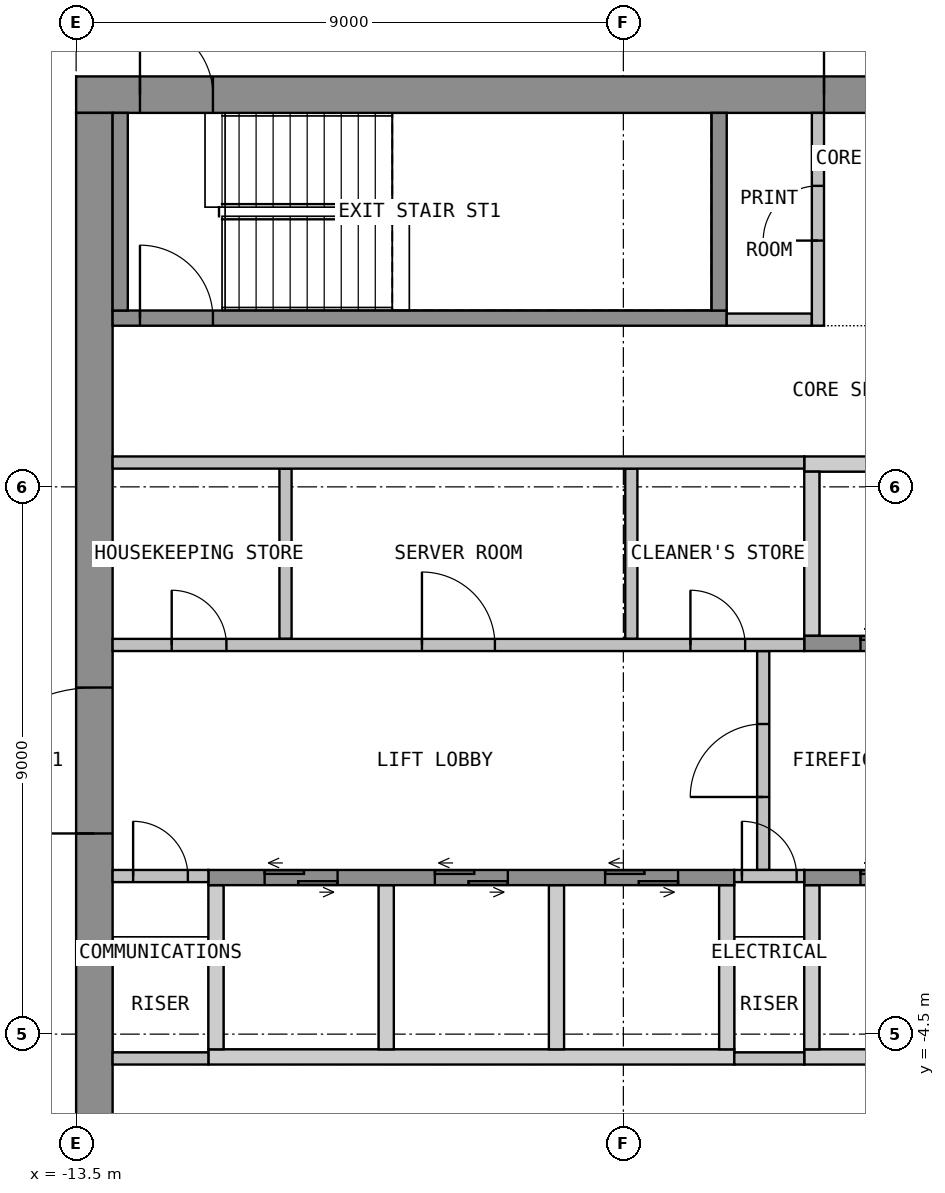
"""IFC4 building model, lengths in metres.
Left out: names, types, materials, properties, quantities, classifications, styles, units other than length and angle.
Written with IfcOpenShell. Run it as: python <this file> out.ifc"""

import sys

from ifc_helpers import new_model, si_unit, direction, frame, frame_2d, origin, place, context, subcontext, project, spatial, polyline, rectangle, outline, extrude, element, fill, save


model = new_model("IFC4")
c1 = context("Model", 3, precision=1e-05, world=origin(), true_north=direction((0.0, 1.0)))
c2 = subcontext(c1, "Body", "Model", "MODEL_VIEW")
j1 = project(units=[si_unit("LENGTHUNIT", "METRE"), si_unit("PLANEANGLEUNIT", "RADIAN")], contexts=[c1])
p1 = place(None, origin())
s1 = spatial("IfcSite", under=j1, at=p1, CompositionType="ELEMENT")
p2 = place(p1, origin())
s2 = spatial("IfcBuilding", under=s1, at=p2, CompositionType="ELEMENT")
p3 = place(p2, frame((0.0, 0.0, 246.9)))
s3 = spatial("IfcBuildingStorey", under=s2, at=p3, CompositionType="ELEMENT", Elevation=246.9)
p4 = place(p3, frame((-13.5, 10.95, 0.0), z_axis=(0.0, 0.0, 1.0), x_axis=(1.0, 0.0, 0.0)))
e1 = element("IfcWall", 1, at=p4, inside=s3, PredefinedType="SHEAR", context=c2, shape_type="SweptSolid", body=[
    extrude(rectangle(XDim=27.0, YDim=0.6, at=frame_2d((13.5, 0.0))), origin(), (0.0, 0.0, 1.0), 3.575),
])
p5 = place(p4, frame((12.3, 0.0, 0.0)))
e2 = element("IfcOpeningElement", 2, at=p5, cuts=e1, PredefinedType="OPENING", context=c2, shape_type="SweptSolid", body=[
    extrude(rectangle(XDim=2.4, YDim=2.1, at=frame_2d((1.2, 1.05))), frame((0.0, 0.31, 0.0), z_axis=(0.0, -1.0, 0.0), x_axis=(1.0, 0.0, 0.0)), (0.0, 0.0, 1.0), 0.62),
])
p6 = place(p4, frame((1.05, 0.0, 0.0)))
e3 = element("IfcOpeningElement", 3, at=p6, cuts=e1, PredefinedType="OPENING", context=c2, shape_type="SweptSolid", body=[
    extrude(rectangle(XDim=1.2, YDim=2.1, at=frame_2d((0.6, 1.05))), frame((0.0, 0.31, 0.0), z_axis=(0.0, -1.0, 0.0), x_axis=(1.0, 0.0, 0.0)), (0.0, 0.0, 1.0), 0.62),
])
p7 = place(p4, frame((24.75, 0.0, 0.0)))
e4 = element("IfcOpeningElement", 4, at=p7, cuts=e1, PredefinedType="OPENING", context=c2, shape_type="SweptSolid", body=[
    extrude(rectangle(XDim=1.2, YDim=2.1, at=frame_2d((0.6, 1.05))), frame((0.0, 0.31, 0.0), z_axis=(0.0, -1.0, 0.0), x_axis=(1.0, 0.0, 0.0)), (0.0, 0.0, 1.0), 0.62),
])
p8 = place(p3, frame((-13.2, -10.65, 0.0), z_axis=(0.0, 0.0, 1.0), x_axis=(0.0, 1.0, 0.0)))
e5 = element("IfcWall", 5, at=p8, inside=s3, PredefinedType="SHEAR", context=c2, shape_type="SweptSolid", body=[
    extrude(rectangle(XDim=21.3, YDim=0.6, at=frame_2d((10.65, 0.0))), origin(), (0.0, 0.0, 1.0), 3.575),
])
p9 = place(p8, frame((9.45, 0.0, 0.0)))
e6 = element("IfcOpeningElement", 6, at=p9, cuts=e5, PredefinedType="OPENING", context=c2, shape_type="SweptSolid", body=[
    extrude(rectangle(XDim=2.4, YDim=2.1, at=frame_2d((1.2, 1.05))), frame((0.0, 0.31, 0.0), z_axis=(0.0, -1.0, 0.0), x_axis=(1.0, 0.0, 0.0)), (0.0, 0.0, 1.0), 0.62),
])
p10 = place(p3, origin())
e7 = element("IfcWall", 7, at=p10, inside=s3, PredefinedType="SHEAR", context=c2, shape_type="SweptSolid", body=[
    extrude(outline(polyline([(-1.525, 4.75), (1.525, 4.75), (1.525, 5.0), (-1.525, 5.0), (-1.525, 4.75)])), origin(), (0.0, 0.0, 1.0), 3.575),
])
p11 = place(p3, origin())
e8 = element("IfcWall", 8, at=p11, inside=s3, PredefinedType="SHEAR", context=c2, shape_type="SweptSolid", body=[
    extrude(outline(polyline([(-1.525, 2.05), (-1.275, 2.05), (-1.275, 4.75), (-1.525, 4.75), (-1.525, 2.05)])), origin(), (0.0, 0.0, 1.0), 3.575),
])
p12 = place(p3, frame((-1.525, 1.925, 0.0), z_axis=(0.0, 0.0, 1.0), x_axis=(1.0, 0.0, 0.0)))
e9 = element("IfcWall", 9, at=p12, inside=s3, PredefinedType="SHEAR", context=c2, shape_type="SweptSolid", body=[
    extrude(rectangle(XDim=3.05, YDim=0.25, at=frame_2d((1.525, 0.0))), origin(), (0.0, 0.0, 1.0), 3.575),
])
p13 = place(p12, frame((0.925, 0.0, 0.0)))
e10 = element("IfcOpeningElement", 10, at=p13, cuts=e9, PredefinedType="OPENING", context=c2, shape_type="SweptSolid", body=[
    extrude(rectangle(XDim=1.2, YDim=2.1, at=frame_2d((0.6, 1.05))), frame((0.0, 0.135, 0.0), z_axis=(0.0, -1.0, 0.0), x_axis=(1.0, 0.0, 0.0)), (0.0, 0.0, 1.0), 0.27),
])
p14 = place(p3, origin())
e11 = element("IfcWall", 11, at=p14, inside=s3, PredefinedType="SHEAR", context=c2, shape_type="SweptSolid", body=[
    extrude(outline(polyline([(-11.325, -5.0), (-2.675, -5.0), (-2.675, -4.75), (-11.325, -4.75), (-11.325, -5.0)])), origin(), (0.0, 0.0, 1.0), 3.575),
])
p15 = place(p3, origin())
e12 = element("IfcWall", 12, at=p15, inside=s3, PredefinedType="SHEAR", context=c2, shape_type="SweptSolid", body=[
    extrude(outline(polyline([(-1.525, -5.0), (4.325, -5.0), (4.325, -4.75), (-1.525, -4.75), (-1.525, -5.0)])), origin(), (0.0, 0.0, 1.0), 3.575),
])
p16 = place(p3, origin())
e13 = element("IfcWall", 13, at=p16, inside=s3, PredefinedType="SHEAR", context=c2, shape_type="SweptSolid", body=[
    extrude(outline(polyline([(-11.325, -4.75), (-11.075, -4.75), (-11.075, -2.05), (-11.325, -2.05), (-11.325, -4.75)])), origin(), (0.0, 0.0, 1.0), 3.575),
])
p17 = place(p3, origin())
e14 = element("IfcWall", 14, at=p17, inside=s3, PredefinedType="SHEAR", context=c2, shape_type="SweptSolid", body=[
    extrude(outline(polyline([(-8.525, -4.75), (-8.275, -4.75), (-8.275, -2.05), (-8.525, -2.05), (-8.525, -4.75)])), origin(), (0.0, 0.0, 1.0), 3.575),
])
p18 = place(p3, origin())
e15 = element("IfcWall", 15, at=p18, inside=s3, PredefinedType="SHEAR", context=c2, shape_type="SweptSolid", body=[
    extrude(outline(polyline([(-5.725, -4.75), (-5.475, -4.75), (-5.475, -2.05), (-5.725, -2.05), (-5.725, -4.75)])), origin(), (0.0, 0.0, 1.0), 3.575),
])
p19 = place(p3, origin())
e16 = element("IfcWall", 16, at=p19, inside=s3, PredefinedType="SHEAR", context=c2, shape_type="SweptSolid", body=[
    extrude(outline(polyline([(-2.925, -4.75), (-2.675, -4.75), (-2.675, -2.05), (-2.925, -2.05), (-2.925, -4.75)])), origin(), (0.0, 0.0, 1.0), 3.575),
])
p20 = place(p3, origin())
e17 = element("IfcWall", 17, at=p20, inside=s3, PredefinedType="SHEAR", context=c2, shape_type="SweptSolid", body=[
    extrude(outline(polyline([(-1.525, -4.75), (-1.275, -4.75), (-1.275, -2.05), (-1.525, -2.05), (-1.525, -4.75)])), origin(), (0.0, 0.0, 1.0), 3.575),
])
p21 = place(p3, frame((-11.325, -1.925, 0.0), z_axis=(0.0, 0.0, 1.0), x_axis=(1.0, 0.0, 0.0)))
e18 = element("IfcWall", 18, at=p21, inside=s3, PredefinedType="SHEAR", context=c2, shape_type="SweptSolid", body=[
    extrude(rectangle(XDim=8.65, YDim=0.25, at=frame_2d((4.325, 0.0))), origin(), (0.0, 0.0, 1.0), 3.575),
])
p22 = place(p21, frame((0.925, 0.0, 0.0)))
e19 = element("IfcOpeningElement", 19, at=p22, cuts=e18, PredefinedType="OPENING", context=c2, shape_type="SweptSolid", body=[
    extrude(rectangle(XDim=1.2, YDim=2.1, at=frame_2d((0.6, 1.05))), frame((0.0, 0.135, 0.0), z_axis=(0.0, -1.0, 0.0), x_axis=(1.0, 0.0, 0.0)), (0.0, 0.0, 1.0), 0.27),
])
p23 = place(p21, frame((3.725, 0.0, 0.0)))
e20 = element("IfcOpeningElement", 20, at=p23, cuts=e18, PredefinedType="OPENING", context=c2, shape_type="SweptSolid", body=[
    extrude(rectangle(XDim=1.2, YDim=2.1, at=frame_2d((0.6, 1.05))), frame((0.0, 0.135, 0.0), z_axis=(0.0, -1.0, 0.0), x_axis=(1.0, 0.0, 0.0)), (0.0, 0.0, 1.0), 0.27),
])
p24 = place(p21, frame((6.525, 0.0, 0.0)))
e21 = element("IfcOpeningElement", 21, at=p24, cuts=e18, PredefinedType="OPENING", context=c2, shape_type="SweptSolid", body=[
    extrude(rectangle(XDim=1.2, YDim=2.1, at=frame_2d((0.6, 1.05))), frame((0.0, 0.135, 0.0), z_axis=(0.0, -1.0, 0.0), x_axis=(1.0, 0.0, 0.0)), (0.0, 0.0, 1.0), 0.27),
])
p25 = place(p3, frame((-1.525, -1.925, 0.0), z_axis=(0.0, 0.0, 1.0), x_axis=(1.0, 0.0, 0.0)))
e22 = element("IfcWall", 22, at=p25, inside=s3, PredefinedType="SHEAR", context=c2, shape_type="SweptSolid", body=[
    extrude(rectangle(XDim=5.85, YDim=0.25, at=frame_2d((2.925, 0.0))), origin(), (0.0, 0.0, 1.0), 3.575),
])
p26 = place(p25, frame((0.925, 0.0, 0.0)))
e23 = element("IfcOpeningElement", 23, at=p26, cuts=e22, PredefinedType="OPENING", context=c2, shape_type="SweptSolid", body=[
    extrude(rectangle(XDim=1.2, YDim=2.1, at=frame_2d((0.6, 1.05))), frame((0.0, 0.135, 0.0), z_axis=(0.0, -1.0, 0.0), x_axis=(1.0, 0.0, 0.0)), (0.0, 0.0, 1.0), 0.27),
])
p27 = place(p25, frame((3.725, 0.0, 0.0)))
e24 = element("IfcOpeningElement", 24, at=p27, cuts=e22, PredefinedType="OPENING", context=c2, shape_type="SweptSolid", body=[
    extrude(rectangle(XDim=1.2, YDim=2.1, at=frame_2d((0.6, 1.05))), frame((0.0, 0.135, 0.0), z_axis=(0.0, -1.0, 0.0), x_axis=(1.0, 0.0, 0.0)), (0.0, 0.0, 1.0), 0.27),
])
p28 = place(p3, frame((-2.2, -1.8, 0.0), z_axis=(0.0, 0.0, 1.0), x_axis=(0.0, 1.0, 0.0)))
e25 = element("IfcWall", 25, at=p28, inside=s3, PredefinedType="PARTITIONING", context=c2, shape_type="SweptSolid", body=[
    extrude(rectangle(XDim=3.6, YDim=0.2, at=frame_2d((1.8, 0.0))), origin(), (0.0, 0.0, 1.0), 3.575),
])
p29 = place(p28, frame((1.2, 0.0, 0.0)))
e26 = element("IfcOpeningElement", 26, at=p29, cuts=e25, PredefinedType="OPENING", context=c2, shape_type="SweptSolid", body=[
    extrude(rectangle(XDim=1.2, YDim=2.1, at=frame_2d((0.6, 1.05))), frame((0.0, 0.11, 0.0), z_axis=(0.0, -1.0, 0.0), x_axis=(1.0, 0.0, 0.0)), (0.0, 0.0, 1.0), 0.22),
])
p30 = place(p3, frame((-12.9, 7.275, 0.0), z_axis=(0.0, 0.0, 1.0), x_axis=(1.0, 0.0, 0.0)))
e27 = element("IfcWall", 27, at=p30, inside=s3, PredefinedType="SHEAR", context=c2, shape_type="SweptSolid", body=[
    extrude(rectangle(XDim=10.1, YDim=0.25, at=frame_2d((5.05, 0.0))), origin(), (0.0, 0.0, 1.0), 3.575),
])
p31 = place(p30, frame((0.45, 0.0, 0.0)))
e28 = element("IfcOpeningElement", 28, at=p31, cuts=e27, PredefinedType="OPENING", context=c2, shape_type="SweptSolid", body=[
    extrude(rectangle(XDim=1.2, YDim=2.1, at=frame_2d((0.6, 1.05))), frame((0.0, 0.135, 0.0), z_axis=(0.0, -1.0, 0.0), x_axis=(1.0, 0.0, 0.0)), (0.0, 0.0, 1.0), 0.27),
])
for number, where, z_axis, x_axis in (
    (29, (-12.775, 7.4, 0.0), (0.0, 0.0, 1.0), (0.0, 1.0, 0.0)),
    (30, (-2.925, 7.4, 0.0), (0.0, 0.0, 1.0), (0.0, 1.0, 0.0)),
):
    element("IfcWall", number, at=place(p3, frame(where, z_axis=z_axis, x_axis=x_axis)), inside=s3, PredefinedType="SHEAR", context=c2, shape_type="SweptSolid", body=[
        extrude(rectangle(XDim=3.25, YDim=0.25, at=frame_2d((1.625, 0.0))), origin(), (0.0, 0.0, 1.0), 3.575),
    ])
p32 = place(p3, frame((-2.8, 7.25, 0.0), z_axis=(0.0, 0.0, 1.0), x_axis=(1.0, 0.0, 0.0)))
e31 = element("IfcWall", 31, at=p32, inside=s3, PredefinedType="PARTITIONING", context=c2, shape_type="SweptSolid", body=[
    extrude(rectangle(XDim=1.4, YDim=0.2, at=frame_2d((0.7, 0.0))), origin(), (0.0, 0.0, 1.0), 3.575),
])
p33 = place(p3, frame((-1.3, 7.15, 0.0), z_axis=(0.0, 0.0, 1.0), x_axis=(0.0, 1.0, 0.0)))
e32 = element("IfcWall", 32, at=p33, inside=s3, PredefinedType="PARTITIONING", context=c2, shape_type="SweptSolid", body=[
    extrude(rectangle(XDim=3.5, YDim=0.2, at=frame_2d((1.75, 0.0))), origin(), (0.0, 0.0, 1.0), 3.575),
])
p34 = place(p33, frame((1.4, 0.0, 0.0)))
e33 = element("IfcOpeningElement", 33, at=p34, cuts=e32, PredefinedType="OPENING", context=c2, shape_type="SweptSolid", body=[
    extrude(rectangle(XDim=0.9, YDim=2.1, at=frame_2d((0.45, 1.05))), frame((0.0, 0.11, 0.0), z_axis=(0.0, -1.0, 0.0), x_axis=(1.0, 0.0, 0.0)), (0.0, 0.0, 1.0), 0.22),
])
for number, where, z_axis, x_axis in (
    (34, (-10.056, 2.0, 0.0), (0.0, 0.0, 1.0), (0.0, 1.0, 0.0)),
    (35, (-4.369, 2.0, 0.0), (0.0, 0.0, 1.0), (0.0, 1.0, 0.0)),
):
    element("IfcWall", number, at=place(p3, frame(where, z_axis=z_axis, x_axis=x_axis)), inside=s3, PredefinedType="PARTITIONING", context=c2, shape_type="SweptSolid", body=[
        extrude(rectangle(XDim=2.8, YDim=0.2, at=frame_2d((1.4, 0.0))), origin(), (0.0, 0.0, 1.0), 3.575),
    ])
p35 = place(p3, frame((-12.9, 1.9, 0.0), z_axis=(0.0, 0.0, 1.0), x_axis=(1.0, 0.0, 0.0)))
e36 = element("IfcWall", 36, at=p35, inside=s3, PredefinedType="PARTITIONING", context=c2, shape_type="SweptSolid", body=[
    extrude(rectangle(XDim=11.375, YDim=0.2, at=frame_2d((5.688, 0.0))), origin(), (0.0, 0.0, 1.0), 3.575),
])
p36 = place(p35, frame((0.972, 0.0, 0.0)))
e37 = element("IfcOpeningElement", 37, at=p36, cuts=e36, PredefinedType="OPENING", context=c2, shape_type="SweptSolid", body=[
    extrude(rectangle(XDim=0.9, YDim=2.1, at=frame_2d((0.45, 1.05))), frame((0.0, 0.11, 0.0), z_axis=(0.0, -1.0, 0.0), x_axis=(1.0, 0.0, 0.0)), (0.0, 0.0, 1.0), 0.22),
])
p37 = place(p35, frame((5.087, 0.0, 0.0)))
e38 = element("IfcOpeningElement", 38, at=p37, cuts=e36, PredefinedType="OPENING", context=c2, shape_type="SweptSolid", body=[
    extrude(rectangle(XDim=1.2, YDim=2.1, at=frame_2d((0.6, 1.05))), frame((0.0, 0.11, 0.0), z_axis=(0.0, -1.0, 0.0), x_axis=(1.0, 0.0, 0.0)), (0.0, 0.0, 1.0), 0.22),
])
p38 = place(p35, frame((9.503, 0.0, 0.0)))
e39 = element("IfcOpeningElement", 39, at=p38, cuts=e36, PredefinedType="OPENING", context=c2, shape_type="SweptSolid", body=[
    extrude(rectangle(XDim=0.9, YDim=2.1, at=frame_2d((0.45, 1.05))), frame((0.0, 0.11, 0.0), z_axis=(0.0, -1.0, 0.0), x_axis=(1.0, 0.0, 0.0)), (0.0, 0.0, 1.0), 0.22),
])
p39 = place(p3, frame((-12.9, 4.9, 0.0), z_axis=(0.0, 0.0, 1.0), x_axis=(1.0, 0.0, 0.0)))
e40 = element("IfcWall", 40, at=p39, inside=s3, PredefinedType="PARTITIONING", context=c2, shape_type="SweptSolid", body=[
    extrude(rectangle(XDim=11.375, YDim=0.2, at=frame_2d((5.688, 0.0))), origin(), (0.0, 0.0, 1.0), 3.575),
])
p40 = place(p3, frame((-12.9, -1.9, 0.0), z_axis=(0.0, 0.0, 1.0), x_axis=(1.0, 0.0, 0.0)))
e41 = element("IfcWall", 41, at=p40, inside=s3, PredefinedType="PARTITIONING", context=c2, shape_type="SweptSolid", body=[
    extrude(rectangle(XDim=1.575, YDim=0.2, at=frame_2d((0.788, 0.0))), origin(), (0.0, 0.0, 1.0), 3.575),
])
p41 = place(p40, frame((0.337, 0.0, 0.0)))
e42 = element("IfcOpeningElement", 42, at=p41, cuts=e41, PredefinedType="OPENING", context=c2, shape_type="SweptSolid", body=[
    extrude(rectangle(XDim=0.9, YDim=2.1, at=frame_2d((0.45, 1.05))), frame((0.0, 0.11, 0.0), z_axis=(0.0, -1.0, 0.0), x_axis=(1.0, 0.0, 0.0)), (0.0, 0.0, 1.0), 0.22),
])
p42 = place(p3, frame((-12.9, -4.9, 0.0), z_axis=(0.0, 0.0, 1.0), x_axis=(1.0, 0.0, 0.0)))
e43 = element("IfcWall", 43, at=p42, inside=s3, PredefinedType="PARTITIONING", context=c2, shape_type="SweptSolid", body=[
    extrude(rectangle(XDim=1.575, YDim=0.2, at=frame_2d((0.788, 0.0))), origin(), (0.0, 0.0, 1.0), 3.575),
])
p43 = place(p3, frame((-2.675, -1.9, 0.0), z_axis=(0.0, 0.0, 1.0), x_axis=(1.0, 0.0, 0.0)))
e44 = element("IfcWall", 44, at=p43, inside=s3, PredefinedType="PARTITIONING", context=c2, shape_type="SweptSolid", body=[
    extrude(rectangle(XDim=1.15, YDim=0.2, at=frame_2d((0.575, 0.0))), origin(), (0.0, 0.0, 1.0), 3.575),
])
p44 = place(p43, frame((0.125, 0.0, 0.0)))
e45 = element("IfcOpeningElement", 45, at=p44, cuts=e44, PredefinedType="OPENING", context=c2, shape_type="SweptSolid", body=[
    extrude(rectangle(XDim=0.9, YDim=2.1, at=frame_2d((0.45, 1.05))), frame((0.0, 0.11, 0.0), z_axis=(0.0, -1.0, 0.0), x_axis=(1.0, 0.0, 0.0)), (0.0, 0.0, 1.0), 0.22),
])
p45 = place(p3, frame((-2.675, -4.9, 0.0), z_axis=(0.0, 0.0, 1.0), x_axis=(1.0, 0.0, 0.0)))
e46 = element("IfcWall", 46, at=p45, inside=s3, PredefinedType="PARTITIONING", context=c2, shape_type="SweptSolid", body=[
    extrude(rectangle(XDim=1.15, YDim=0.2, at=frame_2d((0.575, 0.0))), origin(), (0.0, 0.0, 1.0), 3.575),
])
p46 = place(p9, origin())
e47 = element("IfcDoor", 47, at=p46, inside=s3, OperationType="DOUBLE_DOOR_DOUBLE_SWING", PredefinedType="DOOR", context=c2, shape_type="SweptSolid", body=[
    extrude(rectangle(XDim=2.4, YDim=2.1, at=frame_2d((1.2, 1.05))), frame((0.0, 0.025, 0.0), z_axis=(0.0, -1.0, 0.0), x_axis=(1.0, 0.0, 0.0)), (0.0, 0.0, 1.0), 0.05),
])
fill(e6, e47)
p47 = place(p5, origin())
e48 = element("IfcDoor", 48, at=p47, inside=s3, OperationType="DOUBLE_DOOR_DOUBLE_SWING", PredefinedType="DOOR", context=c2, shape_type="SweptSolid", body=[
    extrude(rectangle(XDim=2.4, YDim=2.1, at=frame_2d((1.2, 1.05))), frame((0.0, 0.025, 0.0), z_axis=(0.0, -1.0, 0.0), x_axis=(1.0, 0.0, 0.0)), (0.0, 0.0, 1.0), 0.05),
])
fill(e2, e48)
p48 = place(p6, origin())
e49 = element("IfcDoor", 49, at=p48, inside=s3, OperationType="SINGLE_SWING_RIGHT", PredefinedType="DOOR", context=c2, shape_type="SweptSolid", body=[
    extrude(rectangle(XDim=1.2, YDim=2.1, at=frame_2d((0.6, 1.05))), frame((0.0, 0.025, 0.0), z_axis=(0.0, -1.0, 0.0), x_axis=(1.0, 0.0, 0.0)), (0.0, 0.0, 1.0), 0.05),
])
fill(e3, e49)
p49 = place(p13, origin())
e50 = element("IfcDoor", 50, at=p49, inside=s3, OperationType="DOUBLE_DOOR_SLIDING", PredefinedType="DOOR", context=c2, shape_type="SweptSolid", body=[
    extrude(rectangle(XDim=1.2, YDim=2.1, at=frame_2d((0.6, 1.05))), frame((0.0, 0.025, 0.0), z_axis=(0.0, -1.0, 0.0), x_axis=(1.0, 0.0, 0.0)), (0.0, 0.0, 1.0), 0.05),
])
fill(e10, e50)
p50 = place(p22, origin())
e51 = element("IfcDoor", 51, at=p50, inside=s3, OperationType="DOUBLE_DOOR_SLIDING", PredefinedType="DOOR", context=c2, shape_type="SweptSolid", body=[
    extrude(rectangle(XDim=1.2, YDim=2.1, at=frame_2d((0.6, 1.05))), frame((0.0, 0.025, 0.0), z_axis=(0.0, -1.0, 0.0), x_axis=(1.0, 0.0, 0.0)), (0.0, 0.0, 1.0), 0.05),
])
fill(e19, e51)
p51 = place(p23, origin())
e52 = element("IfcDoor", 52, at=p51, inside=s3, OperationType="DOUBLE_DOOR_SLIDING", PredefinedType="DOOR", context=c2, shape_type="SweptSolid", body=[
    extrude(rectangle(XDim=1.2, YDim=2.1, at=frame_2d((0.6, 1.05))), frame((0.0, 0.025, 0.0), z_axis=(0.0, -1.0, 0.0), x_axis=(1.0, 0.0, 0.0)), (0.0, 0.0, 1.0), 0.05),
])
fill(e20, e52)
p52 = place(p24, origin())
e53 = element("IfcDoor", 53, at=p52, inside=s3, OperationType="DOUBLE_DOOR_SLIDING", PredefinedType="DOOR", context=c2, shape_type="SweptSolid", body=[
    extrude(rectangle(XDim=1.2, YDim=2.1, at=frame_2d((0.6, 1.05))), frame((0.0, 0.025, 0.0), z_axis=(0.0, -1.0, 0.0), x_axis=(1.0, 0.0, 0.0)), (0.0, 0.0, 1.0), 0.05),
])
fill(e21, e53)
p53 = place(p26, origin())
e54 = element("IfcDoor", 54, at=p53, inside=s3, OperationType="DOUBLE_DOOR_SLIDING", PredefinedType="DOOR", context=c2, shape_type="SweptSolid", body=[
    extrude(rectangle(XDim=1.2, YDim=2.1, at=frame_2d((0.6, 1.05))), frame((0.0, 0.025, 0.0), z_axis=(0.0, -1.0, 0.0), x_axis=(1.0, 0.0, 0.0)), (0.0, 0.0, 1.0), 0.05),
])
fill(e23, e54)
p54 = place(p29, origin())
e55 = element("IfcDoor", 55, at=p54, inside=s3, OperationType="SINGLE_SWING_LEFT", PredefinedType="DOOR", context=c2, shape_type="SweptSolid", body=[
    extrude(rectangle(XDim=1.2, YDim=2.1, at=frame_2d((0.6, 1.05))), frame((0.0, 0.025, 0.0), z_axis=(0.0, -1.0, 0.0), x_axis=(1.0, 0.0, 0.0)), (0.0, 0.0, 1.0), 0.05),
])
fill(e26, e55)
p55 = place(p31, origin())
e56 = element("IfcDoor", 56, at=p55, inside=s3, OperationType="SINGLE_SWING_LEFT", PredefinedType="DOOR", context=c2, shape_type="SweptSolid", body=[
    extrude(rectangle(XDim=1.2, YDim=2.1, at=frame_2d((0.6, 1.05))), frame((0.0, 0.025, 0.0), z_axis=(0.0, -1.0, 0.0), x_axis=(1.0, 0.0, 0.0)), (0.0, 0.0, 1.0), 0.05),
])
fill(e28, e56)
p56 = place(p34, origin())
e57 = element("IfcDoor", 57, at=p56, inside=s3, OperationType="SINGLE_SWING_LEFT", PredefinedType="DOOR", context=c2, shape_type="SweptSolid", body=[
    extrude(rectangle(XDim=0.9, YDim=2.1, at=frame_2d((0.45, 1.05))), frame((0.0, 0.025, 0.0), z_axis=(0.0, -1.0, 0.0), x_axis=(1.0, 0.0, 0.0)), (0.0, 0.0, 1.0), 0.05),
])
fill(e33, e57)
p57 = place(p36, origin())
e58 = element("IfcDoor", 58, at=p57, inside=s3, OperationType="SINGLE_SWING_LEFT", PredefinedType="DOOR", context=c2, shape_type="SweptSolid", body=[
    extrude(rectangle(XDim=0.9, YDim=2.1, at=frame_2d((0.45, 1.05))), frame((0.0, 0.025, 0.0), z_axis=(0.0, -1.0, 0.0), x_axis=(1.0, 0.0, 0.0)), (0.0, 0.0, 1.0), 0.05),
])
fill(e37, e58)
p58 = place(p37, origin())
e59 = element("IfcDoor", 59, at=p58, inside=s3, OperationType="SINGLE_SWING_RIGHT", PredefinedType="DOOR", context=c2, shape_type="SweptSolid", body=[
    extrude(rectangle(XDim=1.2, YDim=2.1, at=frame_2d((0.6, 1.05))), frame((0.0, 0.025, 0.0), z_axis=(0.0, -1.0, 0.0), x_axis=(1.0, 0.0, 0.0)), (0.0, 0.0, 1.0), 0.05),
])
fill(e38, e59)
p59 = place(p38, origin())
e60 = element("IfcDoor", 60, at=p59, inside=s3, OperationType="SINGLE_SWING_LEFT", PredefinedType="DOOR", context=c2, shape_type="SweptSolid", body=[
    extrude(rectangle(XDim=0.9, YDim=2.1, at=frame_2d((0.45, 1.05))), frame((0.0, 0.025, 0.0), z_axis=(0.0, -1.0, 0.0), x_axis=(1.0, 0.0, 0.0)), (0.0, 0.0, 1.0), 0.05),
])
fill(e39, e60)
p60 = place(p41, origin())
e61 = element("IfcDoor", 61, at=p60, inside=s3, OperationType="SINGLE_SWING_LEFT", PredefinedType="DOOR", context=c2, shape_type="SweptSolid", body=[
    extrude(rectangle(XDim=0.9, YDim=2.1, at=frame_2d((0.45, 1.05))), frame((0.0, 0.025, 0.0), z_axis=(0.0, -1.0, 0.0), x_axis=(1.0, 0.0, 0.0)), (0.0, 0.0, 1.0), 0.05),
])
fill(e42, e61)
p61 = place(p44, origin())
e62 = element("IfcDoor", 62, at=p61, inside=s3, OperationType="SINGLE_SWING_LEFT", PredefinedType="DOOR", context=c2, shape_type="SweptSolid", body=[
    extrude(rectangle(XDim=0.9, YDim=2.1, at=frame_2d((0.45, 1.05))), frame((0.0, 0.025, 0.0), z_axis=(0.0, -1.0, 0.0), x_axis=(1.0, 0.0, 0.0)), (0.0, 0.0, 1.0), 0.05),
])
fill(e45, e62)
save(model, sys.argv[1])
